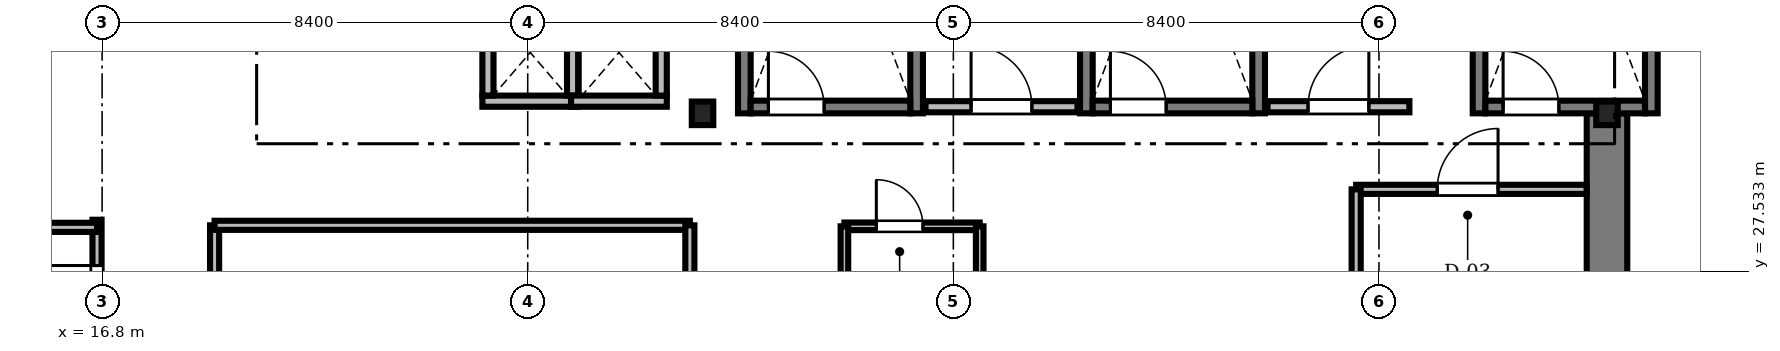
"""IFC4 building model, lengths in metres.
Left out: names, types, materials, properties, quantities, classifications, styles, units other than length and angle.
Written with IfcOpenShell. Run it as: python <this file> out.ifc"""

import sys

from ifc_helpers import new_model, si_unit, direction, frame, frame_2d, origin, origin_2d, place, context, subcontext, project, spatial, rectangle, i_section, extrude, source, transform, mapped, element, fill, save


model = new_model("IFC4")
c1 = context("Model", 3, precision=1e-05, world=origin(), true_north=direction((0.0, 1.0)))
c2 = subcontext(c1, "Body", "Model", "MODEL_VIEW")
j1 = project(units=[si_unit("LENGTHUNIT", "METRE"), si_unit("PLANEANGLEUNIT", "RADIAN")], contexts=[c1])
p1 = place(None, origin())
s1 = spatial("IfcSite", under=j1, at=p1, CompositionType="ELEMENT")
p2 = place(p1, origin())
s2 = spatial("IfcBuilding", under=s1, at=p2, CompositionType="ELEMENT")
p3 = place(p2, frame((0.0, 0.0, 155.7)))
s3 = spatial("IfcBuildingStorey", under=s2, at=p3, CompositionType="ELEMENT", Elevation=155.7)
m1 = source(origin(), c2, "Body", "SweptSolid", [
    extrude(rectangle(XDim=13.15, YDim=0.8, at=frame_2d((6.575, 0.0))), origin(), (0.0, 0.0, 1.0), 3.46),
])
p4 = place(p3, frame((46.5, 17.5, 0.0), z_axis=(0.0, 0.0, 1.0), x_axis=(0.0, 1.0, 0.0)))
e1 = element("IfcWall", 1, at=p4, inside=s3, PredefinedType="SHEAR", context=c2, shape_type="MappedRepresentation", body=[
    mapped(m1, transform((0.0, 0.0, 0.0), scale=1.0)),
])
m2 = source(origin(), c2, "Body", "SweptSolid", [
    extrude(i_section(OverallWidth=0.424, OverallDepth=0.465, WebThickness=0.035, FlangeThickness=0.056, FilletRadius=0.015, at=origin_2d()), origin(), (0.0, 0.0, 1.0), 3.46),
])
for number, where, z_axis, x_axis in (
    (2, (28.65, 30.65, 0.0), (0.0, 0.0, 1.0), (1.0, 0.0, 0.0)),
    (3, (46.5, 30.65, 0.0), (0.0, 0.0, 1.0), (1.0, 0.0, 0.0)),
):
    element("IfcColumn", number, at=place(p3, frame(where, z_axis=z_axis, x_axis=x_axis)), inside=s3, PredefinedType="COLUMN", context=c2, shape_type="MappedRepresentation", body=[
        mapped(m2, transform((0.0, 0.0, 0.0), scale=1.0)),
    ])
m3 = source(origin(), c2, "Body", "SweptSolid", [
    extrude(rectangle(XDim=9.25, YDim=0.25, at=frame_2d((4.625, 0.0))), origin(), (0.0, 0.0, 1.0), 3.5),
])
for number, where, z_axis, x_axis in (
    (4, (29.475, 30.65, 0.0), (0.0, 0.0, 1.0), (0.0, 1.0, 0.0)),
    (5, (32.875, 30.65, 0.0), (0.0, 0.0, 1.0), (0.0, 1.0, 0.0)),
):
    element("IfcWall", number, at=place(p3, frame(where, z_axis=z_axis, x_axis=x_axis)), inside=s3, PredefinedType="SOLIDWALL", context=c2, shape_type="MappedRepresentation", body=[
        mapped(m3, transform((0.0, 0.0, 0.0), scale=1.0)),
    ])
m4 = source(origin(), c2, "Body", "SweptSolid", [
    extrude(rectangle(XDim=3.15, YDim=0.25, at=frame_2d((1.575, 0.0))), origin(), (0.0, 0.0, 1.0), 3.5),
])
p5 = place(p3, frame((29.6, 30.775, 0.0), z_axis=(0.0, 0.0, 1.0), x_axis=(1.0, 0.0, 0.0)))
e6 = element("IfcWall", 6, at=p5, inside=s3, PredefinedType="SOLIDWALL", context=c2, shape_type="MappedRepresentation", body=[
    mapped(m4, transform((0.0, 0.0, 0.0), scale=1.0)),
])
m5 = source(origin(), c2, "Body", "SweptSolid", [
    extrude(rectangle(XDim=1.1, YDim=2.2, at=frame_2d((0.55, 1.1))), frame((0.0, 0.135, 0.0), z_axis=(0.0, -1.0, 0.0), x_axis=(1.0, 0.0, 0.0)), (0.0, 0.0, 1.0), 0.27),
])
p6 = place(p5, frame((0.35, 0.0, 0.0)))
e7 = element("IfcOpeningElement", 7, at=p6, cuts=e6, PredefinedType="OPENING", context=c2, shape_type="MappedRepresentation", body=[
    mapped(m5, transform((0.0, 0.0, 0.0), scale=1.0)),
])
for number, where, z_axis, x_axis in (
    (8, (36.225, 30.65, 0.0), (0.0, 0.0, 1.0), (0.0, 1.0, 0.0)),
    (9, (39.625, 30.65, 0.0), (0.0, 0.0, 1.0), (0.0, 1.0, 0.0)),
):
    element("IfcWall", number, at=place(p3, frame(where, z_axis=z_axis, x_axis=x_axis)), inside=s3, PredefinedType="SOLIDWALL", context=c2, shape_type="MappedRepresentation", body=[
        mapped(m3, transform((0.0, 0.0, 0.0), scale=1.0)),
    ])
p7 = place(p3, frame((36.35, 30.775, 0.0), z_axis=(0.0, 0.0, 1.0), x_axis=(1.0, 0.0, 0.0)))
e10 = element("IfcWall", 10, at=p7, inside=s3, PredefinedType="SOLIDWALL", context=c2, shape_type="MappedRepresentation", body=[
    mapped(m4, transform((0.0, 0.0, 0.0), scale=1.0)),
])
p8 = place(p7, frame((0.35, 0.0, 0.0)))
e11 = element("IfcOpeningElement", 11, at=p8, cuts=e10, PredefinedType="OPENING", context=c2, shape_type="MappedRepresentation", body=[
    mapped(m5, transform((0.0, 0.0, 0.0), scale=1.0)),
])
for number, where, z_axis, x_axis in (
    (12, (43.975, 30.65, 0.0), (0.0, 0.0, 1.0), (0.0, 1.0, 0.0)),
    (13, (47.375, 30.65, 0.0), (0.0, 0.0, 1.0), (0.0, 1.0, 0.0)),
):
    element("IfcWall", number, at=place(p3, frame(where, z_axis=z_axis, x_axis=x_axis)), inside=s3, PredefinedType="SOLIDWALL", context=c2, shape_type="MappedRepresentation", body=[
        mapped(m3, transform((0.0, 0.0, 0.0), scale=1.0)),
    ])
p9 = place(p3, frame((44.1, 30.775, 0.0), z_axis=(0.0, 0.0, 1.0), x_axis=(1.0, 0.0, 0.0)))
e14 = element("IfcWall", 14, at=p9, inside=s3, PredefinedType="SOLIDWALL", context=c2, shape_type="MappedRepresentation", body=[
    mapped(m4, transform((0.0, 0.0, 0.0), scale=1.0)),
])
p10 = place(p9, frame((0.35, 0.0, 0.0)))
e15 = element("IfcOpeningElement", 15, at=p10, cuts=e14, PredefinedType="OPENING", context=c2, shape_type="MappedRepresentation", body=[
    mapped(m5, transform((0.0, 0.0, 0.0), scale=1.0)),
])
m6 = source(origin(), c2, "Body", "SweptSolid", [
    extrude(rectangle(XDim=3.0, YDim=0.22, at=frame_2d((1.5, 0.0))), origin(), (0.0, 0.0, 1.0), 3.46),
])
p11 = place(p3, frame((33.05, 30.78, 0.0), z_axis=(0.0, 0.0, 1.0), x_axis=(1.0, 0.0, 0.0)))
e16 = element("IfcWall", 16, at=p11, inside=s3, PredefinedType="SOLIDWALL", context=c2, shape_type="MappedRepresentation", body=[
    mapped(m6, transform((0.0, 0.0, 0.0), scale=1.0)),
])
m7 = source(origin(), c2, "Body", "SweptSolid", [
    extrude(rectangle(XDim=1.2, YDim=2.2, at=frame_2d((0.6, 1.1))), frame((0.0, 0.12, 0.0), z_axis=(0.0, -1.0, 0.0), x_axis=(1.0, 0.0, 0.0)), (0.0, 0.0, 1.0), 0.24),
])
p12 = place(p11, frame((0.9, 0.0, 0.0)))
e17 = element("IfcOpeningElement", 17, at=p12, cuts=e16, PredefinedType="OPENING", context=c2, shape_type="MappedRepresentation", body=[
    mapped(m7, transform((0.0, 0.0, 0.0), scale=1.0)),
])
m8 = source(origin(), c2, "Body", "SweptSolid", [
    extrude(rectangle(XDim=2.8, YDim=0.22, at=frame_2d((1.4, 0.0))), origin(), (0.0, 0.0, 1.0), 3.46),
])
p13 = place(p3, frame((39.8, 30.78, 0.0), z_axis=(0.0, 0.0, 1.0), x_axis=(1.0, 0.0, 0.0)))
e18 = element("IfcWall", 18, at=p13, inside=s3, PredefinedType="SOLIDWALL", context=c2, shape_type="MappedRepresentation", body=[
    mapped(m8, transform((0.0, 0.0, 0.0), scale=1.0)),
])
p14 = place(p13, frame((0.8, 0.0, 0.0)))
e19 = element("IfcOpeningElement", 19, at=p14, cuts=e18, PredefinedType="OPENING", context=c2, shape_type="MappedRepresentation", body=[
    mapped(m7, transform((0.0, 0.0, 0.0), scale=1.0)),
])
m9 = source(origin(), c2, "Body", "SweptSolid", [
    extrude(rectangle(XDim=1.89, YDim=0.22, at=frame_2d((0.945, 0.0))), origin(), (0.0, 0.0, 1.0), 3.46),
])
p15 = place(p3, frame((24.305, 30.89, 0.0), z_axis=(0.0, 0.0, 1.0), x_axis=(1.0, 0.0, 0.0)))
e20 = element("IfcWall", 20, at=p15, inside=s3, PredefinedType="SOLIDWALL", context=c2, shape_type="MappedRepresentation", body=[
    mapped(m9, transform((0.0, 0.0, 0.0), scale=1.0)),
])
m10 = source(origin(), c2, "Body", "SweptSolid", [
    extrude(rectangle(XDim=1.7, YDim=0.22, at=frame_2d((0.85, 0.0))), origin(), (0.0, 0.0, 1.0), 3.46),
])
for number, where, z_axis, x_axis in (
    (21, (24.415, 31.0, 0.0), (0.0, 0.0, 1.0), (0.0, 1.0, 0.0)),
    (22, (26.085, 31.0, 0.0), (0.0, 0.0, 1.0), (0.0, 1.0, 0.0)),
):
    element("IfcWall", number, at=place(p3, frame(where, z_axis=z_axis, x_axis=x_axis)), inside=s3, PredefinedType="SOLIDWALL", context=c2, shape_type="MappedRepresentation", body=[
        mapped(m10, transform((0.0, 0.0, 0.0), scale=1.0)),
    ])
p16 = place(p3, frame((26.055, 30.89, 0.0), z_axis=(0.0, 0.0, 1.0), x_axis=(1.0, 0.0, 0.0)))
e23 = element("IfcWall", 23, at=p16, inside=s3, PredefinedType="SOLIDWALL", context=c2, shape_type="MappedRepresentation", body=[
    mapped(m9, transform((0.0, 0.0, 0.0), scale=1.0)),
])
p17 = place(p3, frame((27.835, 31.0, 0.0), z_axis=(0.0, 0.0, 1.0), x_axis=(0.0, 1.0, 0.0)))
e24 = element("IfcWall", 24, at=p17, inside=s3, PredefinedType="SOLIDWALL", context=c2, shape_type="MappedRepresentation", body=[
    mapped(m10, transform((0.0, 0.0, 0.0), scale=1.0)),
])
m11 = source(origin(), c2, "Body", "SweptSolid", [
    extrude(rectangle(XDim=14.6, YDim=0.18, at=frame_2d((7.3, 0.0))), origin(), (0.0, 0.0, 1.0), 2.852),
])
p18 = place(p3, frame((16.7, 13.95, 0.0), z_axis=(0.0, 0.0, 1.0), x_axis=(0.0, 1.0, 0.0)))
e25 = element("IfcWall", 25, at=p18, inside=s3, PredefinedType="PARTITIONING", context=c2, shape_type="MappedRepresentation", body=[
    mapped(m11, transform((0.0, 0.0, 0.0), scale=1.0)),
])
m12 = source(origin(), c2, "Body", "SweptSolid", [
    extrude(rectangle(XDim=1.05, YDim=2.2, at=frame_2d((0.525, 1.1))), frame((0.0, 0.1, 0.0), z_axis=(0.0, -1.0, 0.0), x_axis=(1.0, 0.0, 0.0)), (0.0, 0.0, 1.0), 0.2),
])
p19 = place(p18, frame((1.888, 0.0, 0.0)))
e26 = element("IfcOpeningElement", 26, at=p19, cuts=e25, PredefinedType="OPENING", context=c2, shape_type="MappedRepresentation", body=[
    mapped(m12, transform((0.0, 0.0, 0.0), scale=1.0)),
])
m13 = source(origin(), c2, "Body", "SweptSolid", [
    extrude(rectangle(XDim=0.95, YDim=2.15, at=frame_2d((0.475, 1.075))), frame((0.0, 0.1, 0.0), z_axis=(0.0, -1.0, 0.0), x_axis=(1.0, 0.0, 0.0)), (0.0, 0.0, 1.0), 0.2),
])
p20 = place(p18, frame((7.93, 0.0, 0.0)))
e27 = element("IfcOpeningElement", 27, at=p20, cuts=e25, PredefinedType="OPENING", context=c2, shape_type="MappedRepresentation", body=[
    mapped(m13, transform((0.0, 0.0, 0.0), scale=1.0)),
])
p21 = place(p18, frame((12.747, 0.0, 0.0)))
e28 = element("IfcOpeningElement", 28, at=p21, cuts=e25, PredefinedType="OPENING", context=c2, shape_type="MappedRepresentation", body=[
    mapped(m13, transform((0.0, 0.0, 0.0), scale=1.0)),
])
m14 = source(origin(), c2, "Body", "SweptSolid", [
    extrude(rectangle(XDim=6.54, YDim=0.18, at=frame_2d((3.27, 0.0))), origin(), (0.0, 0.0, 1.0), 2.852),
])
p22 = place(p3, frame((19.02, 21.9, 0.0), z_axis=(0.0, 0.0, 1.0), x_axis=(0.0, 1.0, 0.0)))
e29 = element("IfcWall", 29, at=p22, inside=s3, PredefinedType="PARTITIONING", context=c2, shape_type="MappedRepresentation", body=[
    mapped(m14, transform((0.0, 0.0, 0.0), scale=1.0)),
])
p23 = place(p22, frame((2.2, 0.0, 0.0)))
e30 = element("IfcOpeningElement", 30, at=p23, cuts=e29, PredefinedType="OPENING", context=c2, shape_type="MappedRepresentation", body=[
    mapped(m12, transform((0.0, 0.0, 0.0), scale=1.0)),
])
m15 = source(origin(), c2, "Body", "SweptSolid", [
    extrude(rectangle(XDim=4.548, YDim=0.18, at=frame_2d((2.274, 0.0))), origin(), (0.0, 0.0, 1.0), 3.092),
])
p24 = place(p3, frame((41.55, 29.15, 0.0), z_axis=(0.0, 0.0, 1.0), x_axis=(1.0, 0.0, 0.0)))
e31 = element("IfcWall", 31, at=p24, inside=s3, PredefinedType="PARTITIONING", context=c2, shape_type="MappedRepresentation", body=[
    mapped(m15, transform((0.0, 0.0, 0.0), scale=1.0)),
])
m16 = source(origin(), c2, "Body", "SweptSolid", [
    extrude(rectangle(XDim=1.2, YDim=2.2, at=frame_2d((0.6, 1.1))), frame((0.0, 0.1, 0.0), z_axis=(0.0, -1.0, 0.0), x_axis=(1.0, 0.0, 0.0)), (0.0, 0.0, 1.0), 0.2),
])
p25 = place(p24, frame((1.6, 0.0, 0.0)))
e32 = element("IfcOpeningElement", 32, at=p25, cuts=e31, PredefinedType="OPENING", context=c2, shape_type="MappedRepresentation", body=[
    mapped(m16, transform((0.0, 0.0, 0.0), scale=1.0)),
])
m17 = source(origin(), c2, "Body", "SweptSolid", [
    extrude(rectangle(XDim=2.67, YDim=0.15, at=frame_2d((1.335, 0.0))), origin(), (0.0, 0.0, 1.0), 3.092),
])
p26 = place(p3, frame((31.45, 28.42, 0.0), z_axis=(0.0, 0.0, 1.0), x_axis=(1.0, 0.0, 0.0)))
e33 = element("IfcWall", 33, at=p26, inside=s3, PredefinedType="PARTITIONING", context=c2, shape_type="MappedRepresentation", body=[
    mapped(m17, transform((0.0, 0.0, 0.0), scale=1.0)),
])
m18 = source(origin(), c2, "Body", "SweptSolid", [
    extrude(rectangle(XDim=0.92, YDim=2.1, at=frame_2d((0.46, 1.05))), frame((0.0, 0.085, 0.0), z_axis=(0.0, -1.0, 0.0), x_axis=(1.0, 0.0, 0.0)), (0.0, 0.0, 1.0), 0.17),
])
p27 = place(p26, frame((0.63, 0.0, 0.0)))
e34 = element("IfcOpeningElement", 34, at=p27, cuts=e33, PredefinedType="OPENING", context=c2, shape_type="MappedRepresentation", body=[
    mapped(m18, transform((0.0, 0.0, 0.0), scale=1.0)),
])
m19 = source(origin(), c2, "Body", "SweptSolid", [
    extrude(rectangle(XDim=9.97, YDim=0.18, at=frame_2d((4.985, 0.0))), origin(), (0.0, 0.0, 1.0), 2.702),
])
p28 = place(p3, frame((6.73, 28.4, 0.0), z_axis=(0.0, 0.0, 1.0), x_axis=(1.0, 0.0, 0.0)))
e35 = element("IfcWall", 35, at=p28, inside=s3, PredefinedType="PARTITIONING", context=c2, shape_type="MappedRepresentation", body=[
    mapped(m19, transform((0.0, 0.0, 0.0), scale=1.0)),
])
m20 = source(origin(), c2, "Body", "SweptSolid", [
    extrude(rectangle(XDim=9.38, YDim=0.18, at=frame_2d((4.69, 0.0))), origin(), (0.0, 0.0, 1.0), 3.46),
])
p29 = place(p3, frame((19.02, 28.44, 0.0), z_axis=(0.0, 0.0, 1.0), x_axis=(1.0, 0.0, 0.0)))
e36 = element("IfcWall", 36, at=p29, inside=s3, PredefinedType="PARTITIONING", context=c2, shape_type="MappedRepresentation", body=[
    mapped(m20, transform((0.0, 0.0, 0.0), scale=1.0)),
])
p30 = place(p3, frame((28.4, 21.9, 0.0), z_axis=(0.0, 0.0, 1.0), x_axis=(0.0, 1.0, 0.0)))
e37 = element("IfcWall", 37, at=p30, inside=s3, PredefinedType="PARTITIONING", context=c2, shape_type="MappedRepresentation", body=[
    mapped(m14, transform((0.0, 0.0, 0.0), scale=1.0)),
])
m21 = source(origin(), c2, "Body", "SweptSolid", [
    extrude(rectangle(XDim=2.35, YDim=0.18, at=frame_2d((1.175, 0.0))), origin(), (0.0, 0.0, 1.0), 2.852),
])
p31 = place(p3, frame((41.55, 26.8, 0.0), z_axis=(0.0, 0.0, 1.0), x_axis=(0.0, 1.0, 0.0)))
e38 = element("IfcWall", 38, at=p31, inside=s3, PredefinedType="PARTITIONING", context=c2, shape_type="MappedRepresentation", body=[
    mapped(m21, transform((0.0, 0.0, 0.0), scale=1.0)),
])
m22 = source(origin(), c2, "Body", "SweptSolid", [
    extrude(rectangle(XDim=1.6, YDim=0.15, at=frame_2d((0.8, 0.0))), origin(), (0.0, 0.0, 1.0), 3.002),
])
for number, where, z_axis, x_axis in (
    (39, (31.45, 26.82, 0.0), (0.0, 0.0, 1.0), (0.0, 1.0, 0.0)),
    (40, (34.12, 26.82, 0.0), (0.0, 0.0, 1.0), (0.0, 1.0, 0.0)),
):
    element("IfcWall", number, at=place(p3, frame(where, z_axis=z_axis, x_axis=x_axis)), inside=s3, PredefinedType="PARTITIONING", context=c2, shape_type="MappedRepresentation", body=[
        mapped(m22, transform((0.0, 0.0, 0.0), scale=1.0)),
    ])
m23 = source(origin(), c2, "Body", "SweptSolid", [
    extrude(rectangle(XDim=1.1, YDim=2.2, at=frame_2d((0.55, 1.1))), frame((0.0, 0.025, 0.0), z_axis=(0.0, -1.0, 0.0), x_axis=(1.0, 0.0, 0.0)), (0.0, 0.0, 1.0), 0.05),
])
p32 = place(p6, origin())
e41 = element("IfcDoor", 41, at=p32, inside=s3, OperationType="SINGLE_SWING_LEFT", PredefinedType="DOOR", context=c2, shape_type="MappedRepresentation", body=[
    mapped(m23, transform((0.0, 0.0, 0.0), scale=1.0)),
])
fill(e7, e41)
p33 = place(p8, origin())
e42 = element("IfcDoor", 42, at=p33, inside=s3, OperationType="SINGLE_SWING_LEFT", PredefinedType="DOOR", context=c2, shape_type="MappedRepresentation", body=[
    mapped(m23, transform((0.0, 0.0, 0.0), scale=1.0)),
])
fill(e11, e42)
p34 = place(p10, origin())
e43 = element("IfcDoor", 43, at=p34, inside=s3, OperationType="SINGLE_SWING_LEFT", PredefinedType="DOOR", context=c2, shape_type="MappedRepresentation", body=[
    mapped(m23, transform((0.0, 0.0, 0.0), scale=1.0)),
])
fill(e15, e43)
m24 = source(origin(), c2, "Body", "SweptSolid", [
    extrude(rectangle(XDim=1.2, YDim=2.2, at=frame_2d((0.6, 1.1))), frame((0.0, 0.025, 0.0), z_axis=(0.0, -1.0, 0.0), x_axis=(1.0, 0.0, 0.0)), (0.0, 0.0, 1.0), 0.05),
])
p35 = place(p12, origin())
e44 = element("IfcDoor", 44, at=p35, inside=s3, OperationType="SINGLE_SWING_LEFT", PredefinedType="DOOR", context=c2, shape_type="MappedRepresentation", body=[
    mapped(m24, transform((0.0, 0.0, 0.0), scale=1.0)),
])
fill(e17, e44)
p36 = place(p14, origin())
e45 = element("IfcDoor", 45, at=p36, inside=s3, OperationType="SINGLE_SWING_RIGHT", PredefinedType="DOOR", context=c2, shape_type="MappedRepresentation", body=[
    mapped(m24, transform((0.0, 0.0, 0.0), scale=1.0)),
])
fill(e19, e45)
m25 = source(origin(), c2, "Body", "SweptSolid", [
    extrude(rectangle(XDim=0.95, YDim=2.15, at=frame_2d((0.475, 1.075))), frame((0.0, 0.025, 0.0), z_axis=(0.0, -1.0, 0.0), x_axis=(1.0, 0.0, 0.0)), (0.0, 0.0, 1.0), 0.05),
])
p37 = place(p21, origin())
e46 = element("IfcDoor", 46, at=p37, inside=s3, OperationType="SINGLE_SWING_RIGHT", PredefinedType="DOOR", context=c2, shape_type="MappedRepresentation", body=[
    mapped(m25, transform((0.0, 0.0, 0.0), scale=1.0)),
])
fill(e28, e46)
p38 = place(p25, origin())
e47 = element("IfcDoor", 47, at=p38, inside=s3, OperationType="SINGLE_SWING_RIGHT", PredefinedType="DOOR", context=c2, shape_type="MappedRepresentation", body=[
    mapped(m24, transform((0.0, 0.0, 0.0), scale=1.0)),
])
fill(e32, e47)
m26 = source(origin(), c2, "Body", "SweptSolid", [
    extrude(rectangle(XDim=0.92, YDim=2.1, at=frame_2d((0.46, 1.05))), frame((0.0, 0.025, 0.0), z_axis=(0.0, -1.0, 0.0), x_axis=(1.0, 0.0, 0.0)), (0.0, 0.0, 1.0), 0.05),
])
p39 = place(p27, origin())
e48 = element("IfcDoor", 48, at=p39, inside=s3, OperationType="SINGLE_SWING_LEFT", PredefinedType="DOOR", context=c2, shape_type="MappedRepresentation", body=[
    mapped(m26, transform((0.0, 0.0, 0.0), scale=1.0)),
])
fill(e34, e48)
save(model, sys.argv[1])
